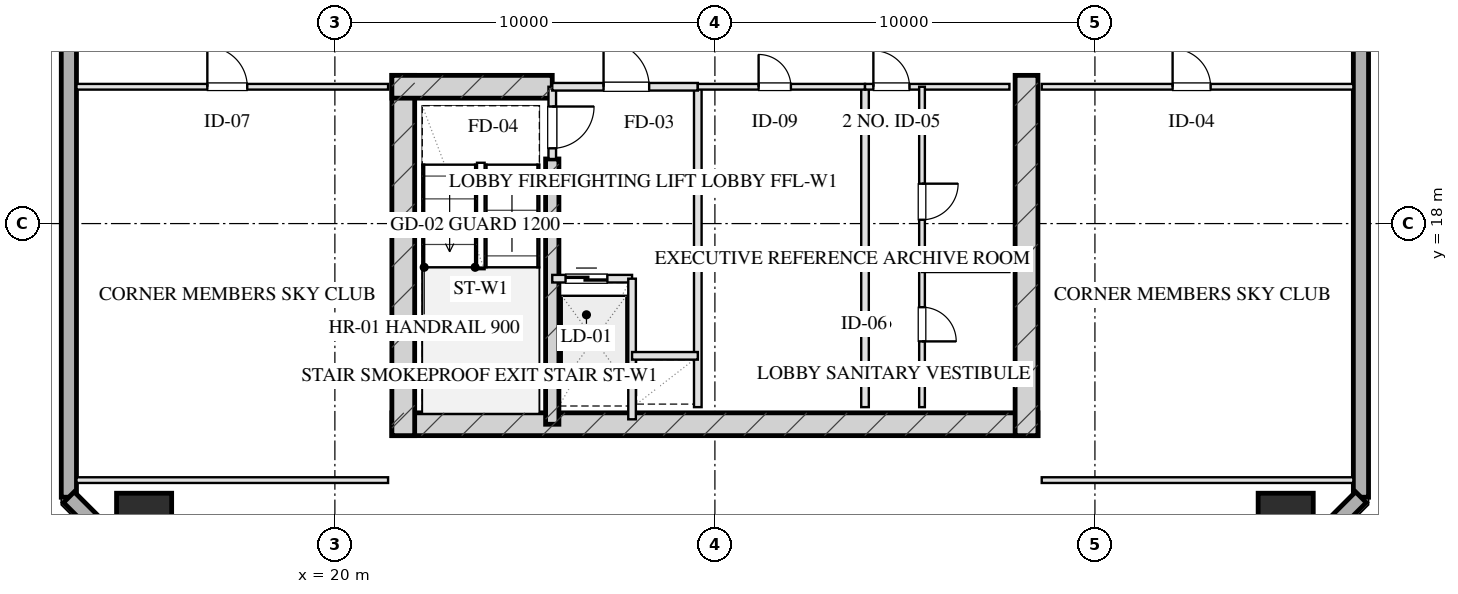
"""IFC4 building model, lengths in metres.
Left out: names, types, materials, properties, quantities, classifications, styles, units other than length and angle.
Written with IfcOpenShell. Run it as: python <this file> out.ifc"""

import sys

from ifc_helpers import new_model, si_unit, direction, frame, frame_2d, origin, origin_2d, place, context, subcontext, project, spatial, rectangle, hollow_rectangle, extrude, element, fill, save


model = new_model("IFC4")
c1 = context("Model", 3, precision=1e-05, world=origin(), true_north=direction((0.0, 1.0)))
c2 = subcontext(c1, "Body", "Model", "MODEL_VIEW")
j1 = project(units=[si_unit("LENGTHUNIT", "METRE"), si_unit("PLANEANGLEUNIT", "RADIAN")], contexts=[c1])
p1 = place(None, origin())
s1 = spatial("IfcSite", under=j1, at=p1, CompositionType="ELEMENT")
p2 = place(p1, origin())
s2 = spatial("IfcBuilding", under=s1, at=p2, CompositionType="ELEMENT")
p3 = place(p2, frame((0.0, 0.0, 159.85)))
s3 = spatial("IfcBuildingStorey", under=s2, at=p3, CompositionType="ELEMENT", Elevation=159.85)
p4 = place(p3, frame((21.5, 12.72, 0.0), z_axis=(0.0, 0.0, 1.0), x_axis=(1.0, 0.0, 0.0)))
e1 = element("IfcWall", 1, at=p4, inside=s3, PredefinedType="SHEAR", context=c2, shape_type="SweptSolid", body=[
    extrude(rectangle(XDim=17.0, YDim=0.6, at=frame_2d((8.5, 0.0))), origin(), (0.0, 0.0, 1.0), 3.45),
])
for number, where, z_axis, x_axis in (
    (2, (21.8, 21.9, 0.0), (0.0, 0.0, 1.0), (0.0, -1.0, 0.0)),
    (3, (38.2, 21.9, 0.0), (0.0, 0.0, 1.0), (0.0, -1.0, 0.0)),
):
    element("IfcWall", number, at=place(p3, frame(where, z_axis=z_axis, x_axis=x_axis)), inside=s3, PredefinedType="SHEAR", context=c2, shape_type="SweptSolid", body=[
        extrude(rectangle(XDim=9.48, YDim=0.6, at=frame_2d((4.74, 0.0))), origin(), (0.0, 0.0, 1.0), 3.45),
    ])
p5 = place(p3, frame((25.72, 19.7, 0.0), z_axis=(0.0, 0.0, 1.0), x_axis=(0.0, -1.0, 0.0)))
e4 = element("IfcWall", 4, at=p5, inside=s3, PredefinedType="SHEAR", context=c2, shape_type="SweptSolid", body=[
    extrude(rectangle(XDim=6.98, YDim=0.35, at=frame_2d((3.49, 0.0))), origin(), (0.0, 0.0, 1.0), 3.45),
])
p6 = place(p3, frame((21.5, 21.6, 0.0), z_axis=(0.0, 0.0, 1.0), x_axis=(1.0, 0.0, 0.0)))
e5 = element("IfcWall", 5, at=p6, inside=s3, PredefinedType="SHEAR", context=c2, shape_type="SweptSolid", body=[
    extrude(rectangle(XDim=4.22, YDim=0.6, at=frame_2d((2.11, 0.0))), origin(), (0.0, 0.0, 1.0), 3.45),
])
for number, where, z_axis, x_axis in (
    (6, (14.98, 10.18, 0.0), (0.0, 0.0, 1.0), (1.0, 0.0, 0.0)),
    (7, (45.02, 10.18, 0.0), (0.0, 0.0, 1.0), (1.0, 0.0, 0.0)),
):
    element("IfcColumn", number, at=place(p3, frame(where, z_axis=z_axis, x_axis=x_axis)), inside=s3, PredefinedType="COLUMN", context=c2, shape_type="SweptSolid", body=[
        extrude(hollow_rectangle(XDim=1.45, YDim=1.45, WallThickness=0.05, at=origin_2d()), origin(), (0.0, 0.0, 1.0), 3.451),
    ])
p7 = place(p3, frame((13.0, 10.8, 0.0), z_axis=(0.0, 0.0, 1.0), x_axis=(0.0, 1.0, 0.0)))
e8 = element("IfcWall", 8, at=p7, inside=s3, PredefinedType="SOLIDWALL", context=c2, shape_type="SweptSolid", body=[
    extrude(rectangle(XDim=46.4, YDim=0.4, at=frame_2d((23.2, 0.0))), origin(), (0.0, 0.0, 1.0), 2.61),
])
p8 = place(p7, frame((15.675, 0.0, 0.75)))
e9 = element("IfcOpeningElement", 9, at=p8, cuts=e8, PredefinedType="OPENING", context=c2, shape_type="SweptSolid", body=[
    extrude(rectangle(XDim=2.25, YDim=1.46, at=frame_2d((1.125, 0.73))), frame((0.0, 0.21, 0.0), z_axis=(0.0, -1.0, 0.0), x_axis=(1.0, 0.0, 0.0)), (0.0, 0.0, 1.0), 0.42),
])
p9 = place(p7, frame((28.475, 0.0, 0.75)))
e10 = element("IfcOpeningElement", 10, at=p9, cuts=e8, PredefinedType="OPENING", context=c2, shape_type="SweptSolid", body=[
    extrude(rectangle(XDim=2.25, YDim=1.46, at=frame_2d((1.125, 0.73))), frame((0.0, 0.21, 0.0), z_axis=(0.0, -1.0, 0.0), x_axis=(1.0, 0.0, 0.0)), (0.0, 0.0, 1.0), 0.42),
])
p10 = place(p3, frame((47.0, 57.2, 0.0), z_axis=(0.0, 0.0, 1.0), x_axis=(0.0, -1.0, 0.0)))
e11 = element("IfcWall", 11, at=p10, inside=s3, PredefinedType="SOLIDWALL", context=c2, shape_type="SweptSolid", body=[
    extrude(rectangle(XDim=46.4, YDim=0.4, at=frame_2d((23.2, 0.0))), origin(), (0.0, 0.0, 1.0), 2.61),
])
for number, where, z_axis, x_axis in (
    (12, (47.0, 10.8, 0.0), (0.0, 0.0, 1.0), (-0.707, -0.707, 0.0)),
    (13, (15.6, 8.2, 0.0), (0.0, 0.0, 1.0), (-0.707, 0.707, 0.0)),
):
    element("IfcWall", number, at=place(p3, frame(where, z_axis=z_axis, x_axis=x_axis)), inside=s3, PredefinedType="SOLIDWALL", context=c2, shape_type="SweptSolid", body=[
        extrude(rectangle(XDim=3.677, YDim=0.4, at=frame_2d((1.838, 0.0))), origin(), (0.0, 0.0, 1.0), 2.61),
    ])
p11 = place(p3, frame((25.72, 21.6, 0.0), z_axis=(0.0, 0.0, 1.0), x_axis=(0.0, -1.0, 0.0)))
e14 = element("IfcWall", 14, at=p11, inside=s3, PredefinedType="PARTITIONING", context=c2, shape_type="SweptSolid", body=[
    extrude(rectangle(XDim=1.9, YDim=0.2, at=frame_2d((0.95, 0.0))), origin(), (0.0, 0.0, 1.0), 3.175),
])
p12 = place(p11, frame((0.52, 0.0, 0.0)))
e15 = element("IfcOpeningElement", 15, at=p12, cuts=e14, PredefinedType="OPENING", context=c2, shape_type="SweptSolid", body=[
    extrude(rectangle(XDim=1.1, YDim=2.05, at=frame_2d((0.55, 1.025))), frame((0.0, 0.11, 0.0), z_axis=(0.0, -1.0, 0.0), x_axis=(1.0, 0.0, 0.0)), (0.0, 0.0, 1.0), 0.22),
])
p13 = place(p3, frame((29.55, 21.6, 0.0), z_axis=(0.0, 0.0, 1.0), x_axis=(0.0, -1.0, 0.0)))
e16 = element("IfcWall", 16, at=p13, inside=s3, PredefinedType="PARTITIONING", context=c2, shape_type="SweptSolid", body=[
    extrude(rectangle(XDim=8.43, YDim=0.2, at=frame_2d((4.215, 0.0))), origin(), (0.0, 0.0, 1.0), 3.175),
])
p14 = place(p3, frame((25.72, 21.6, 0.0), z_axis=(0.0, 0.0, 1.0), x_axis=(1.0, 0.0, 0.0)))
e17 = element("IfcWall", 17, at=p14, inside=s3, PredefinedType="PARTITIONING", context=c2, shape_type="SweptSolid", body=[
    extrude(rectangle(XDim=3.83, YDim=0.2, at=frame_2d((1.915, 0.0))), origin(), (0.0, 0.0, 1.0), 3.175),
])
p15 = place(p14, frame((1.35, 0.0, 0.0)))
e18 = element("IfcOpeningElement", 18, at=p15, cuts=e17, PredefinedType="OPENING", context=c2, shape_type="SweptSolid", body=[
    extrude(rectangle(XDim=1.2, YDim=2.05, at=frame_2d((0.6, 1.025))), frame((0.0, 0.11, 0.0), z_axis=(0.0, -1.0, 0.0), x_axis=(1.0, 0.0, 0.0)), (0.0, 0.0, 1.0), 0.22),
])
p16 = place(p3, frame((25.72, 16.55, 0.0), z_axis=(0.0, 0.0, 1.0), x_axis=(1.0, 0.0, 0.0)))
e19 = element("IfcWall", 19, at=p16, inside=s3, PredefinedType="PARTITIONING", context=c2, shape_type="SweptSolid", body=[
    extrude(rectangle(XDim=2.1, YDim=0.2, at=frame_2d((1.05, 0.0))), origin(), (0.0, 0.0, 1.0), 3.175),
])
p17 = place(p16, frame((0.35, 0.0, 0.0)))
e20 = element("IfcOpeningElement", 20, at=p17, cuts=e19, PredefinedType="OPENING", context=c2, shape_type="SweptSolid", body=[
    extrude(rectangle(XDim=1.1, YDim=2.05, at=frame_2d((0.55, 1.025))), frame((0.0, 0.11, 0.0), z_axis=(0.0, -1.0, 0.0), x_axis=(1.0, 0.0, 0.0)), (0.0, 0.0, 1.0), 0.22),
])
p18 = place(p3, frame((27.82, 16.55, 0.0), z_axis=(0.0, 0.0, 1.0), x_axis=(0.0, -1.0, 0.0)))
e21 = element("IfcWall", 21, at=p18, inside=s3, PredefinedType="PARTITIONING", context=c2, shape_type="SweptSolid", body=[
    extrude(rectangle(XDim=3.7, YDim=0.2, at=frame_2d((1.85, 0.0))), origin(), (0.0, 0.0, 1.0), 3.175),
])
p19 = place(p3, frame((27.82, 14.52, 0.0), z_axis=(0.0, 0.0, 1.0), x_axis=(1.0, 0.0, 0.0)))
e22 = element("IfcWall", 22, at=p19, inside=s3, PredefinedType="PARTITIONING", context=c2, shape_type="SweptSolid", body=[
    extrude(rectangle(XDim=1.73, YDim=0.2, at=frame_2d((0.865, 0.0))), origin(), (0.0, 0.0, 1.0), 3.175),
])
p20 = place(p3, frame((33.95, 21.6, 0.0), z_axis=(0.0, 0.0, 1.0), x_axis=(0.0, -1.0, 0.0)))
e23 = element("IfcWall", 23, at=p20, inside=s3, PredefinedType="PARTITIONING", context=c2, shape_type="SweptSolid", body=[
    extrude(rectangle(XDim=8.43, YDim=0.2, at=frame_2d((4.215, 0.0))), origin(), (0.0, 0.0, 1.0), 3.175),
])
p21 = place(p3, frame((29.55, 21.6, 0.0), z_axis=(0.0, 0.0, 1.0), x_axis=(1.0, 0.0, 0.0)))
e24 = element("IfcWall", 24, at=p21, inside=s3, PredefinedType="PARTITIONING", context=c2, shape_type="SweptSolid", body=[
    extrude(rectangle(XDim=4.4, YDim=0.15, at=frame_2d((2.2, 0.0))), origin(), (0.0, 0.0, 1.0), 3.175),
])
p22 = place(p21, frame((1.6, 0.0, 0.0)))
e25 = element("IfcOpeningElement", 25, at=p22, cuts=e24, PredefinedType="OPENING", context=c2, shape_type="SweptSolid", body=[
    extrude(rectangle(XDim=0.85, YDim=2.05, at=frame_2d((0.425, 1.025))), frame((0.0, 0.085, 0.0), z_axis=(0.0, -1.0, 0.0), x_axis=(1.0, 0.0, 0.0)), (0.0, 0.0, 1.0), 0.17),
])
p23 = place(p3, frame((33.95, 21.6, 0.0), z_axis=(0.0, 0.0, 1.0), x_axis=(1.0, 0.0, 0.0)))
e26 = element("IfcWall", 26, at=p23, inside=s3, PredefinedType="PARTITIONING", context=c2, shape_type="SweptSolid", body=[
    extrude(rectangle(XDim=3.8, YDim=0.15, at=frame_2d((1.9, 0.0))), origin(), (0.0, 0.0, 1.0), 3.175),
])
p24 = place(p23, frame((0.22, 0.0, 0.0)))
e27 = element("IfcOpeningElement", 27, at=p24, cuts=e26, PredefinedType="OPENING", context=c2, shape_type="SweptSolid", body=[
    extrude(rectangle(XDim=0.95, YDim=2.05, at=frame_2d((0.475, 1.025))), frame((0.0, 0.085, 0.0), z_axis=(0.0, -1.0, 0.0), x_axis=(1.0, 0.0, 0.0)), (0.0, 0.0, 1.0), 0.17),
])
p25 = place(p3, frame((35.45, 21.6, 0.0), z_axis=(0.0, 0.0, 1.0), x_axis=(0.0, -1.0, 0.0)))
e28 = element("IfcWall", 28, at=p25, inside=s3, PredefinedType="PARTITIONING", context=c2, shape_type="SweptSolid", body=[
    extrude(rectangle(XDim=8.43, YDim=0.15, at=frame_2d((4.215, 0.0))), origin(), (0.0, 0.0, 1.0), 2.765),
])
p26 = place(p25, frame((2.55, 0.0, 0.0)))
e29 = element("IfcOpeningElement", 29, at=p26, cuts=e28, PredefinedType="OPENING", context=c2, shape_type="SweptSolid", body=[
    extrude(rectangle(XDim=0.95, YDim=2.05, at=frame_2d((0.475, 1.025))), frame((0.0, 0.085, 0.0), z_axis=(0.0, -1.0, 0.0), x_axis=(1.0, 0.0, 0.0)), (0.0, 0.0, 1.0), 0.17),
])
p27 = place(p25, frame((5.8, 0.0, 0.0)))
e30 = element("IfcOpeningElement", 30, at=p27, cuts=e28, PredefinedType="OPENING", context=c2, shape_type="SweptSolid", body=[
    extrude(rectangle(XDim=0.9, YDim=2.05, at=frame_2d((0.45, 1.025))), frame((0.0, 0.085, 0.0), z_axis=(0.0, -1.0, 0.0), x_axis=(1.0, 0.0, 0.0)), (0.0, 0.0, 1.0), 0.17),
])
p28 = place(p3, frame((35.45, 16.8, 0.0), z_axis=(0.0, 0.0, 1.0), x_axis=(1.0, 0.0, 0.0)))
e31 = element("IfcWall", 31, at=p28, inside=s3, PredefinedType="PARTITIONING", context=c2, shape_type="SweptSolid", body=[
    extrude(rectangle(XDim=2.3, YDim=0.15, at=frame_2d((1.15, 0.0))), origin(), (0.0, 0.0, 1.0), 3.175),
])
p29 = place(p3, frame((13.2, 11.25, 0.0), z_axis=(0.0, 0.0, 1.0), x_axis=(1.0, 0.0, 0.0)))
e32 = element("IfcWall", 32, at=p29, inside=s3, PredefinedType="PARTITIONING", context=c2, shape_type="SweptSolid", body=[
    extrude(rectangle(XDim=8.2, YDim=0.15, at=frame_2d((4.1, 0.0))), origin(), (0.0, 0.0, 1.0), 3.175),
])
p30 = place(p3, frame((13.2, 21.6, 0.0), z_axis=(0.0, 0.0, 1.0), x_axis=(1.0, 0.0, 0.0)))
e33 = element("IfcWall", 33, at=p30, inside=s3, PredefinedType="PARTITIONING", context=c2, shape_type="SweptSolid", body=[
    extrude(rectangle(XDim=8.2, YDim=0.15, at=frame_2d((4.1, 0.0))), origin(), (0.0, 0.0, 1.0), 3.175),
])
p31 = place(p30, frame((3.444, 0.0, 0.0)))
e34 = element("IfcOpeningElement", 34, at=p31, cuts=e33, PredefinedType="OPENING", context=c2, shape_type="SweptSolid", body=[
    extrude(rectangle(XDim=1.05, YDim=2.05, at=frame_2d((0.525, 1.025))), frame((0.0, 0.085, 0.0), z_axis=(0.0, -1.0, 0.0), x_axis=(1.0, 0.0, 0.0)), (0.0, 0.0, 1.0), 0.17),
])
p32 = place(p3, frame((38.6, 11.25, 0.0), z_axis=(0.0, 0.0, 1.0), x_axis=(1.0, 0.0, 0.0)))
e35 = element("IfcWall", 35, at=p32, inside=s3, PredefinedType="PARTITIONING", context=c2, shape_type="SweptSolid", body=[
    extrude(rectangle(XDim=8.2, YDim=0.15, at=frame_2d((4.1, 0.0))), origin(), (0.0, 0.0, 1.0), 3.175),
])
p33 = place(p3, frame((38.6, 21.6, 0.0), z_axis=(0.0, 0.0, 1.0), x_axis=(1.0, 0.0, 0.0)))
e36 = element("IfcWall", 36, at=p33, inside=s3, PredefinedType="PARTITIONING", context=c2, shape_type="SweptSolid", body=[
    extrude(rectangle(XDim=8.2, YDim=0.15, at=frame_2d((4.1, 0.0))), origin(), (0.0, 0.0, 1.0), 3.175),
])
p34 = place(p33, frame((3.444, 0.0, 0.0)))
e37 = element("IfcOpeningElement", 37, at=p34, cuts=e36, PredefinedType="OPENING", context=c2, shape_type="SweptSolid", body=[
    extrude(rectangle(XDim=1.0, YDim=2.05, at=frame_2d((0.5, 1.025))), frame((0.0, 0.085, 0.0), z_axis=(0.0, -1.0, 0.0), x_axis=(1.0, 0.0, 0.0)), (0.0, 0.0, 1.0), 0.17),
])
p35 = place(p12, origin())
e38 = element("IfcDoor", 38, at=p35, inside=s3, OperationType="SINGLE_SWING_LEFT", PredefinedType="DOOR", context=c2, shape_type="SweptSolid", body=[
    extrude(rectangle(XDim=1.1, YDim=2.05, at=frame_2d((0.55, 1.025))), frame((0.0, 0.025, 0.0), z_axis=(0.0, -1.0, 0.0), x_axis=(1.0, 0.0, 0.0)), (0.0, 0.0, 1.0), 0.05),
])
fill(e15, e38)
p36 = place(p15, origin())
e39 = element("IfcDoor", 39, at=p36, inside=s3, OperationType="SINGLE_SWING_LEFT", PredefinedType="DOOR", context=c2, shape_type="SweptSolid", body=[
    extrude(rectangle(XDim=1.2, YDim=2.05, at=frame_2d((0.6, 1.025))), frame((0.0, 0.025, 0.0), z_axis=(0.0, -1.0, 0.0), x_axis=(1.0, 0.0, 0.0)), (0.0, 0.0, 1.0), 0.05),
])
fill(e18, e39)
p37 = place(p17, origin())
e40 = element("IfcDoor", 40, at=p37, inside=s3, OperationType="DOUBLE_DOOR_SLIDING", PredefinedType="DOOR", context=c2, shape_type="SweptSolid", body=[
    extrude(rectangle(XDim=1.1, YDim=2.05, at=frame_2d((0.55, 1.025))), frame((0.0, 0.025, 0.0), z_axis=(0.0, -1.0, 0.0), x_axis=(1.0, 0.0, 0.0)), (0.0, 0.0, 1.0), 0.05),
])
fill(e20, e40)
p38 = place(p22, origin())
e41 = element("IfcDoor", 41, at=p38, inside=s3, OperationType="SINGLE_SWING_LEFT", PredefinedType="DOOR", context=c2, shape_type="SweptSolid", body=[
    extrude(rectangle(XDim=0.85, YDim=2.05, at=frame_2d((0.425, 1.025))), frame((0.0, 0.025, 0.0), z_axis=(0.0, -1.0, 0.0), x_axis=(1.0, 0.0, 0.0)), (0.0, 0.0, 1.0), 0.05),
])
fill(e25, e41)
p39 = place(p24, origin())
e42 = element("IfcDoor", 42, at=p39, inside=s3, OperationType="SINGLE_SWING_LEFT", PredefinedType="DOOR", context=c2, shape_type="SweptSolid", body=[
    extrude(rectangle(XDim=0.95, YDim=2.05, at=frame_2d((0.475, 1.025))), frame((0.0, 0.025, 0.0), z_axis=(0.0, -1.0, 0.0), x_axis=(1.0, 0.0, 0.0)), (0.0, 0.0, 1.0), 0.05),
])
fill(e27, e42)
p40 = place(p26, origin())
e43 = element("IfcDoor", 43, at=p40, inside=s3, OperationType="SINGLE_SWING_LEFT", PredefinedType="DOOR", context=c2, shape_type="SweptSolid", body=[
    extrude(rectangle(XDim=0.95, YDim=2.05, at=frame_2d((0.475, 1.025))), frame((0.0, 0.025, 0.0), z_axis=(0.0, -1.0, 0.0), x_axis=(1.0, 0.0, 0.0)), (0.0, 0.0, 1.0), 0.05),
])
fill(e29, e43)
p41 = place(p27, origin())
e44 = element("IfcDoor", 44, at=p41, inside=s3, OperationType="SINGLE_SWING_RIGHT", PredefinedType="DOOR", context=c2, shape_type="SweptSolid", body=[
    extrude(rectangle(XDim=0.9, YDim=2.05, at=frame_2d((0.45, 1.025))), frame((0.0, 0.025, 0.0), z_axis=(0.0, -1.0, 0.0), x_axis=(1.0, 0.0, 0.0)), (0.0, 0.0, 1.0), 0.05),
])
fill(e30, e44)
p42 = place(p31, origin())
e45 = element("IfcDoor", 45, at=p42, inside=s3, OperationType="SINGLE_SWING_LEFT", PredefinedType="DOOR", context=c2, shape_type="SweptSolid", body=[
    extrude(rectangle(XDim=1.05, YDim=2.05, at=frame_2d((0.525, 1.025))), frame((0.0, 0.025, 0.0), z_axis=(0.0, -1.0, 0.0), x_axis=(1.0, 0.0, 0.0)), (0.0, 0.0, 1.0), 0.05),
])
fill(e34, e45)
p43 = place(p34, origin())
e46 = element("IfcDoor", 46, at=p43, inside=s3, OperationType="SINGLE_SWING_LEFT", PredefinedType="DOOR", context=c2, shape_type="SweptSolid", body=[
    extrude(rectangle(XDim=1.0, YDim=2.05, at=frame_2d((0.5, 1.025))), frame((0.0, 0.025, 0.0), z_axis=(0.0, -1.0, 0.0), x_axis=(1.0, 0.0, 0.0)), (0.0, 0.0, 1.0), 0.05),
])
fill(e37, e46)
save(model, sys.argv[1])
